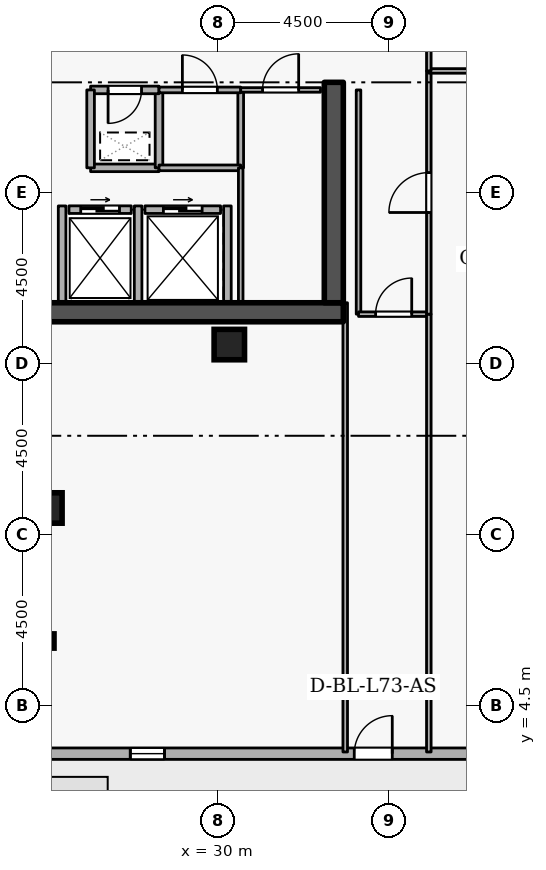
"""IFC4 building model, lengths in metres.
Left out: names, types, materials, properties, quantities, classifications, styles, units other than length and angle.
Written with IfcOpenShell. Run it as: python <this file> out.ifc"""

import sys

from ifc_helpers import new_model, si_unit, direction, frame, frame_2d, origin, origin_2d, place, context, subcontext, project, spatial, rectangle, i_section, extrude, element, fill, save


model = new_model("IFC4")
c1 = context("Model", 3, precision=1e-05, world=origin(), true_north=direction((0.0, 1.0)))
c2 = subcontext(c1, "Body", "Model", "MODEL_VIEW")
j1 = project(units=[si_unit("LENGTHUNIT", "METRE"), si_unit("PLANEANGLEUNIT", "RADIAN")], contexts=[c1])
p1 = place(None, origin())
s1 = spatial("IfcSite", under=j1, at=p1, CompositionType="ELEMENT")
p2 = place(p1, origin())
s2 = spatial("IfcBuilding", under=s1, at=p2, CompositionType="ELEMENT")
p3 = place(p2, frame((0.0, 0.0, 272.7)))
s3 = spatial("IfcBuildingStorey", under=s2, at=p3, CompositionType="ELEMENT", Elevation=272.7)
p4 = place(p3, frame((17.7, 14.85, 0.0), z_axis=(0.0, 0.0, 1.0), x_axis=(1.0, 0.0, 0.0)))
e1 = element("IfcWall", 1, at=p4, inside=s3, PredefinedType="SHEAR", context=c2, shape_type="SweptSolid", body=[
    extrude(rectangle(XDim=15.6, YDim=0.5, at=frame_2d((7.8, 0.0))), origin(), (0.0, 0.0, 1.0), 3.6),
])
p5 = place(p3, frame((33.05, 15.1, 0.0), z_axis=(0.0, 0.0, 1.0), x_axis=(0.0, 1.0, 0.0)))
e2 = element("IfcWall", 2, at=p5, inside=s3, PredefinedType="SHEAR", context=c2, shape_type="SweptSolid", body=[
    extrude(rectangle(XDim=5.8, YDim=0.5, at=frame_2d((2.9, 0.0))), origin(), (0.0, 0.0, 1.0), 3.6),
])
for number, where, z_axis, x_axis in (
    (3, (25.5, 9.7, 0.0), (0.0, 0.0, 1.0), (1.0, 0.0, 0.0)),
    (4, (30.3, 14.0, 0.0), (0.0, 0.0, 1.0), (1.0, 0.0, 0.0)),
):
    element("IfcColumn", number, at=place(p3, frame(where, z_axis=z_axis, x_axis=x_axis)), inside=s3, PredefinedType="COLUMN", context=c2, shape_type="SweptSolid", body=[
        extrude(rectangle(XDim=0.8, YDim=0.8, at=origin_2d()), origin(), (0.0, 0.0, 1.0), 3.6),
    ])
p6 = place(p3, frame((25.5, 6.2, 0.0), z_axis=(0.0, 0.0, 1.0), x_axis=(1.0, 0.0, 0.0)))
e5 = element("IfcColumn", 5, at=p6, inside=s3, PredefinedType="COLUMN", context=c2, shape_type="SweptSolid", body=[
    extrude(i_section(OverallWidth=0.375, OverallDepth=0.375, WebThickness=0.017, FlangeThickness=0.027, FilletRadius=0.015, at=origin_2d()), origin(), (0.0, 0.0, 1.0), 3.6),
])
p7 = place(p3, frame((10.594, 3.236, 0.0), z_axis=(0.0, 0.0, 1.0), x_axis=(0.999999999634, -2.7061402e-05, 0.0)))
e6 = element("IfcWall", 6, at=p7, inside=s3, PredefinedType="STANDARD", context=c2, shape_type="SweptSolid", body=[
    extrude(rectangle(XDim=36.087, YDim=0.3, at=frame_2d((18.043, 0.0))), origin(), (0.0, 0.0, 1.0), 2.7),
])
p8 = place(p7, frame((22.993, 0.0, 0.0)))
e7 = element("IfcOpeningElement", 7, at=p8, cuts=e6, PredefinedType="OPENING", context=c2, shape_type="SweptSolid", body=[
    extrude(rectangle(XDim=1.0, YDim=2.08, at=frame_2d((0.5, 1.04))), frame((0.0, 0.16, 0.0), z_axis=(0.0, -1.0, 0.0), x_axis=(1.0, 0.0, 0.0)), (0.0, 0.0, 1.0), 0.32),
])
p9 = place(p7, frame((2.7, 0.0, 0.72)))
e8 = element("IfcOpeningElement", 8, at=p9, cuts=e6, PredefinedType="OPENING", context=c2, shape_type="SweptSolid", body=[
    extrude(rectangle(XDim=0.9, YDim=1.75, at=frame_2d((0.45, 0.875))), frame((0.0, 0.16, 0.0), z_axis=(0.0, -1.0, 0.0), x_axis=(1.0, 0.0, 0.0)), (0.0, 0.0, 1.0), 0.32),
])
p10 = place(p7, frame((7.5, 0.0, 0.72)))
e9 = element("IfcOpeningElement", 9, at=p10, cuts=e6, PredefinedType="OPENING", context=c2, shape_type="SweptSolid", body=[
    extrude(rectangle(XDim=0.9, YDim=1.75, at=frame_2d((0.45, 0.875))), frame((0.0, 0.16, 0.0), z_axis=(0.0, -1.0, 0.0), x_axis=(1.0, 0.0, 0.0)), (0.0, 0.0, 1.0), 0.32),
])
p11 = place(p7, frame((12.3, 0.0, 0.72)))
e10 = element("IfcOpeningElement", 10, at=p11, cuts=e6, PredefinedType="OPENING", context=c2, shape_type="SweptSolid", body=[
    extrude(rectangle(XDim=0.9, YDim=1.75, at=frame_2d((0.45, 0.875))), frame((0.0, 0.16, 0.0), z_axis=(0.0, -1.0, 0.0), x_axis=(1.0, 0.0, 0.0)), (0.0, 0.0, 1.0), 0.32),
])
p12 = place(p7, frame((17.1, 0.0, 0.72)))
e11 = element("IfcOpeningElement", 11, at=p12, cuts=e6, PredefinedType="OPENING", context=c2, shape_type="SweptSolid", body=[
    extrude(rectangle(XDim=0.9, YDim=1.75, at=frame_2d((0.45, 0.875))), frame((0.0, 0.16, 0.0), z_axis=(0.0, -1.0, 0.0), x_axis=(1.0, 0.0, 0.0)), (0.0, 0.0, 1.0), 0.32),
])
p13 = place(p7, frame((26.7, 0.0, 0.72)))
e12 = element("IfcOpeningElement", 12, at=p13, cuts=e6, PredefinedType="OPENING", context=c2, shape_type="SweptSolid", body=[
    extrude(rectangle(XDim=0.9, YDim=1.75, at=frame_2d((0.45, 0.875))), frame((0.0, 0.16, 0.0), z_axis=(0.0, -1.0, 0.0), x_axis=(1.0, 0.0, 0.0)), (0.0, 0.0, 1.0), 0.32),
])
p14 = place(p7, frame((31.5, 0.0, 0.72)))
e13 = element("IfcOpeningElement", 13, at=p14, cuts=e6, PredefinedType="OPENING", context=c2, shape_type="SweptSolid", body=[
    extrude(rectangle(XDim=0.9, YDim=1.75, at=frame_2d((0.45, 0.875))), frame((0.0, 0.16, 0.0), z_axis=(0.0, -1.0, 0.0), x_axis=(1.0, 0.0, 0.0)), (0.0, 0.0, 1.0), 0.32),
])
p15 = place(p3, frame((26.08, 17.55, 0.0), z_axis=(0.0, 0.0, 1.0), x_axis=(1.0, 0.0, 0.0)))
e14 = element("IfcWall", 14, at=p15, inside=s3, PredefinedType="STANDARD", context=c2, shape_type="SweptSolid", body=[
    extrude(rectangle(XDim=1.64, YDim=0.2, at=frame_2d((0.82, 0.0))), origin(), (0.0, 0.0, 1.0), 3.34),
])
p16 = place(p15, frame((0.31, 0.0, 0.0)))
e15 = element("IfcOpeningElement", 15, at=p16, cuts=e14, PredefinedType="OPENING", context=c2, shape_type="SweptSolid", body=[
    extrude(rectangle(XDim=1.02, YDim=2.06, at=frame_2d((0.51, 1.03))), frame((0.0, 0.11, 0.0), z_axis=(0.0, -1.0, 0.0), x_axis=(1.0, 0.0, 0.0)), (0.0, 0.0, 1.0), 0.22),
])
p17 = place(p3, frame((28.08, 17.55, 0.0), z_axis=(0.0, 0.0, 1.0), x_axis=(1.0, 0.0, 0.0)))
e16 = element("IfcWall", 16, at=p17, inside=s3, PredefinedType="STANDARD", context=c2, shape_type="SweptSolid", body=[
    extrude(rectangle(XDim=1.99, YDim=0.2, at=frame_2d((0.995, 0.0))), origin(), (0.0, 0.0, 1.0), 3.34),
])
p18 = place(p17, frame((0.485, 0.0, 0.0)))
e17 = element("IfcOpeningElement", 17, at=p18, cuts=e16, PredefinedType="OPENING", context=c2, shape_type="SweptSolid", body=[
    extrude(rectangle(XDim=1.02, YDim=2.06, at=frame_2d((0.51, 1.03))), frame((0.0, 0.11, 0.0), z_axis=(0.0, -1.0, 0.0), x_axis=(1.0, 0.0, 0.0)), (0.0, 0.0, 1.0), 0.22),
])
for number, where, z_axis, x_axis in (
    (18, (27.9, 15.112, 0.0), (0.0, 0.0, 1.0), (0.0, 1.0, 0.0)),
    (19, (25.9, 15.112, 0.0), (0.0, 0.0, 1.0), (0.0, 1.0, 0.0)),
    (20, (30.25, 15.112, 0.0), (0.0, 0.0, 1.0), (0.0, 1.0, 0.0)),
):
    element("IfcWall", number, at=place(p3, frame(where, z_axis=z_axis, x_axis=x_axis)), inside=s3, PredefinedType="STANDARD", context=c2, shape_type="SweptSolid", body=[
        extrude(rectangle(XDim=2.536, YDim=0.2, at=frame_2d((1.268, 0.0))), origin(), (0.0, 0.0, 1.0), 3.34),
    ])
p19 = place(p3, frame((26.65, 18.65, 0.0), z_axis=(0.0, 0.0, 1.0), x_axis=(1.0, 0.0, 0.0)))
e21 = element("IfcWall", 21, at=p19, inside=s3, PredefinedType="STANDARD", context=c2, shape_type="SweptSolid", body=[
    extrude(rectangle(XDim=1.8, YDim=0.2, at=frame_2d((0.9, 0.0))), origin(), (0.0, 0.0, 1.0), 3.34),
])
p20 = place(p3, frame((28.45, 18.65, 0.0), z_axis=(0.0, 0.0, 1.0), x_axis=(0.0, 1.0, 0.0)))
e22 = element("IfcWall", 22, at=p20, inside=s3, PredefinedType="STANDARD", context=c2, shape_type="SweptSolid", body=[
    extrude(rectangle(XDim=2.05, YDim=0.2, at=frame_2d((1.025, 0.0))), origin(), (0.0, 0.0, 1.0), 3.34),
])
p21 = place(p3, frame((28.45, 20.7, 0.0), z_axis=(0.0, 0.0, 1.0), x_axis=(-1.0, 0.0, 0.0)))
e23 = element("IfcWall", 23, at=p21, inside=s3, PredefinedType="STANDARD", context=c2, shape_type="SweptSolid", body=[
    extrude(rectangle(XDim=1.8, YDim=0.2, at=frame_2d((0.9, 0.0))), origin(), (0.0, 0.0, 1.0), 3.34),
])
p22 = place(p21, frame((0.46, 0.0, 0.0)))
e24 = element("IfcOpeningElement", 24, at=p22, cuts=e23, PredefinedType="OPENING", context=c2, shape_type="SweptSolid", body=[
    extrude(rectangle(XDim=0.88, YDim=2.04, at=frame_2d((0.44, 1.02))), frame((0.0, 0.11, 0.0), z_axis=(0.0, -1.0, 0.0), x_axis=(1.0, 0.0, 0.0)), (0.0, 0.0, 1.0), 0.22),
])
p23 = place(p3, frame((26.65, 20.7, 0.0), z_axis=(0.0, 0.0, 1.0), x_axis=(0.0, -1.0, 0.0)))
e25 = element("IfcWall", 25, at=p23, inside=s3, PredefinedType="STANDARD", context=c2, shape_type="SweptSolid", body=[
    extrude(rectangle(XDim=2.05, YDim=0.2, at=frame_2d((1.025, 0.0))), origin(), (0.0, 0.0, 1.0), 3.34),
])
p24 = place(p3, frame((30.6, 20.7, 0.0), z_axis=(0.0, 0.0, 1.0), x_axis=(0.0, -1.0, 0.0)))
e26 = element("IfcWall", 26, at=p24, inside=s3, PredefinedType="PARTITIONING", context=c2, shape_type="SweptSolid", body=[
    extrude(rectangle(XDim=2.05, YDim=0.15, at=frame_2d((1.025, 0.0))), origin(), (0.0, 0.0, 1.0), 3.34),
])
p25 = place(p3, frame((30.6, 18.65, 0.0), z_axis=(0.0, 0.0, 1.0), x_axis=(-1.0, 0.0, 0.0)))
e27 = element("IfcWall", 27, at=p25, inside=s3, PredefinedType="PARTITIONING", context=c2, shape_type="SweptSolid", body=[
    extrude(rectangle(XDim=2.15, YDim=0.15, at=frame_2d((1.075, 0.0))), origin(), (0.0, 0.0, 1.0), 3.34),
])
p26 = place(p3, frame((28.45, 20.7, 0.0), z_axis=(0.0, 0.0, 1.0), x_axis=(1.0, 0.0, 0.0)))
e28 = element("IfcWall", 28, at=p26, inside=s3, PredefinedType="PARTITIONING", context=c2, shape_type="SweptSolid", body=[
    extrude(rectangle(XDim=2.15, YDim=0.15, at=frame_2d((1.075, 0.0))), origin(), (0.0, 0.0, 1.0), 3.34),
])
p27 = place(p26, frame((0.615, 0.0, 0.0)))
e29 = element("IfcOpeningElement", 29, at=p27, cuts=e28, PredefinedType="OPENING", context=c2, shape_type="SweptSolid", body=[
    extrude(rectangle(XDim=0.92, YDim=2.08, at=frame_2d((0.46, 1.04))), frame((0.0, 0.085, 0.0), z_axis=(0.0, -1.0, 0.0), x_axis=(1.0, 0.0, 0.0)), (0.0, 0.0, 1.0), 0.17),
])
p28 = place(p3, frame((30.6, 15.1, 0.0), z_axis=(0.0, 0.0, 1.0), x_axis=(0.0, 1.0, 0.0)))
e30 = element("IfcWall", 30, at=p28, inside=s3, PredefinedType="PARTITIONING", context=c2, shape_type="SweptSolid", body=[
    extrude(rectangle(XDim=3.55, YDim=0.12, at=frame_2d((1.775, 0.0))), origin(), (0.0, 0.0, 1.0), 3.34),
])
p29 = place(p3, frame((30.6, 20.7, 0.0), z_axis=(0.0, 0.0, 1.0), x_axis=(1.0, 0.0, 0.0)))
e31 = element("IfcWall", 31, at=p29, inside=s3, PredefinedType="PARTITIONING", context=c2, shape_type="SweptSolid", body=[
    extrude(rectangle(XDim=2.1, YDim=0.12, at=frame_2d((1.05, 0.0))), origin(), (0.0, 0.0, 1.0), 3.34),
])
p30 = place(p29, frame((0.575, 0.0, 0.0)))
e32 = element("IfcOpeningElement", 32, at=p30, cuts=e31, PredefinedType="OPENING", context=c2, shape_type="SweptSolid", body=[
    extrude(rectangle(XDim=0.95, YDim=2.1, at=frame_2d((0.475, 1.05))), frame((0.0, 0.07, 0.0), z_axis=(0.0, -1.0, 0.0), x_axis=(1.0, 0.0, 0.0)), (0.0, 0.0, 1.0), 0.14),
])
p31 = place(p3, frame((33.7, 20.7, 0.0), z_axis=(0.0, 0.0, 1.0), x_axis=(0.0, -1.0, 0.0)))
e33 = element("IfcWall", 33, at=p31, inside=s3, PredefinedType="PARTITIONING", context=c2, shape_type="SweptSolid", body=[
    extrude(rectangle(XDim=5.9, YDim=0.12, at=frame_2d((2.95, 0.0))), origin(), (0.0, 0.0, 1.0), 3.34),
])
p32 = place(p3, frame((33.7, 14.8, 0.0), z_axis=(0.0, 0.0, 1.0), x_axis=(1.0, 0.0, 0.0)))
e34 = element("IfcWall", 34, at=p32, inside=s3, PredefinedType="PARTITIONING", context=c2, shape_type="SweptSolid", body=[
    extrude(rectangle(XDim=1.85, YDim=0.12, at=frame_2d((0.925, 0.0))), origin(), (0.0, 0.0, 1.0), 3.34),
])
p33 = place(p32, frame((0.45, 0.0, 0.0)))
e35 = element("IfcOpeningElement", 35, at=p33, cuts=e34, PredefinedType="OPENING", context=c2, shape_type="SweptSolid", body=[
    extrude(rectangle(XDim=0.95, YDim=2.1, at=frame_2d((0.475, 1.05))), frame((0.0, 0.07, 0.0), z_axis=(0.0, -1.0, 0.0), x_axis=(1.0, 0.0, 0.0)), (0.0, 0.0, 1.0), 0.14),
])
p34 = place(p3, frame((35.55, 14.8, 0.0), z_axis=(0.0, 0.0, 1.0), x_axis=(0.0, -1.0, 0.0)))
e36 = element("IfcWall", 36, at=p34, inside=s3, PredefinedType="PARTITIONING", context=c2, shape_type="SweptSolid", body=[
    extrude(rectangle(XDim=11.52, YDim=0.12, at=frame_2d((5.76, 0.0))), origin(), (0.0, 0.0, 1.0), 3.34),
])
p35 = place(p3, frame((33.35, 3.28, 0.0), z_axis=(0.0, 0.0, 1.0), x_axis=(0.0, 1.0, 0.0)))
e37 = element("IfcWall", 37, at=p35, inside=s3, PredefinedType="PARTITIONING", context=c2, shape_type="SweptSolid", body=[
    extrude(rectangle(XDim=11.82, YDim=0.12, at=frame_2d((5.91, 0.0))), origin(), (0.0, 0.0, 1.0), 2.545),
])
p36 = place(p3, frame((35.55, 14.8, 0.0), z_axis=(0.0, 0.0, 1.0), x_axis=(0.0, 1.0, 0.0)))
e38 = element("IfcWall", 38, at=p36, inside=s3, PredefinedType="PARTITIONING", context=c2, shape_type="SweptSolid", body=[
    extrude(rectangle(XDim=6.4, YDim=0.12, at=frame_2d((3.2, 0.0))), origin(), (0.0, 0.0, 1.0), 3.34),
])
p37 = place(p36, frame((2.675, 0.0, 0.0)))
e39 = element("IfcOpeningElement", 39, at=p37, cuts=e38, PredefinedType="OPENING", context=c2, shape_type="SweptSolid", body=[
    extrude(rectangle(XDim=1.05, YDim=2.1, at=frame_2d((0.525, 1.05))), frame((0.0, 0.07, 0.0), z_axis=(0.0, -1.0, 0.0), x_axis=(1.0, 0.0, 0.0)), (0.0, 0.0, 1.0), 0.14),
])
p38 = place(p3, frame((35.55, 21.2, 0.0), z_axis=(0.0, 0.0, 1.0), x_axis=(1.0, 0.0, 0.0)))
e40 = element("IfcWall", 40, at=p38, inside=s3, PredefinedType="PARTITIONING", context=c2, shape_type="SweptSolid", body=[
    extrude(rectangle(XDim=13.67, YDim=0.12, at=frame_2d((6.835, 0.0))), origin(), (0.0, 0.0, 1.0), 3.34),
])
p39 = place(p3, frame((35.55, 21.2, 0.0), z_axis=(0.0, 0.0, 1.0), x_axis=(0.0, 1.0, 0.0)))
e41 = element("IfcWall", 41, at=p39, inside=s3, PredefinedType="PARTITIONING", context=c2, shape_type="SweptSolid", body=[
    extrude(rectangle(XDim=5.4, YDim=0.12, at=frame_2d((2.7, 0.0))), origin(), (0.0, 0.0, 1.0), 3.34),
])
p40 = place(p39, frame((2.225, 0.0, 0.0)))
e42 = element("IfcOpeningElement", 42, at=p40, cuts=e41, PredefinedType="OPENING", context=c2, shape_type="SweptSolid", body=[
    extrude(rectangle(XDim=0.95, YDim=2.1, at=frame_2d((0.475, 1.05))), frame((0.0, 0.07, 0.0), z_axis=(0.0, -1.0, 0.0), x_axis=(1.0, 0.0, 0.0)), (0.0, 0.0, 1.0), 0.14),
])
p41 = place(p8, origin())
e43 = element("IfcDoor", 43, at=p41, inside=s3, OperationType="SINGLE_SWING_RIGHT", PredefinedType="DOOR", context=c2, shape_type="SweptSolid", body=[
    extrude(rectangle(XDim=1.0, YDim=2.08, at=frame_2d((0.5, 1.04))), frame((0.0, 0.025, 0.0), z_axis=(0.0, -1.0, 0.0), x_axis=(1.0, 0.0, 0.0)), (0.0, 0.0, 1.0), 0.05),
])
fill(e7, e43)
p42 = place(p12, origin())
e44 = element("IfcWindow", 44, at=p42, inside=s3, PartitioningType="SINGLE_PANEL", PredefinedType="WINDOW", context=c2, shape_type="SweptSolid", body=[
    extrude(rectangle(XDim=0.9, YDim=1.75, at=frame_2d((0.45, 0.875))), frame((0.0, 0.03, 0.0), z_axis=(0.0, -1.0, 0.0), x_axis=(1.0, 0.0, 0.0)), (0.0, 0.0, 1.0), 0.06),
])
fill(e11, e44)
p43 = place(p16, origin())
e45 = element("IfcDoor", 45, at=p43, inside=s3, OperationType="SLIDING_TO_LEFT", PredefinedType="DOOR", context=c2, shape_type="SweptSolid", body=[
    extrude(rectangle(XDim=1.02, YDim=2.06, at=frame_2d((0.51, 1.03))), frame((0.0, 0.025, 0.0), z_axis=(0.0, -1.0, 0.0), x_axis=(1.0, 0.0, 0.0)), (0.0, 0.0, 1.0), 0.05),
])
fill(e15, e45)
p44 = place(p18, origin())
e46 = element("IfcDoor", 46, at=p44, inside=s3, OperationType="SLIDING_TO_LEFT", PredefinedType="DOOR", context=c2, shape_type="SweptSolid", body=[
    extrude(rectangle(XDim=1.02, YDim=2.06, at=frame_2d((0.51, 1.03))), frame((0.0, 0.025, 0.0), z_axis=(0.0, -1.0, 0.0), x_axis=(1.0, 0.0, 0.0)), (0.0, 0.0, 1.0), 0.05),
])
fill(e17, e46)
p45 = place(p22, origin())
e47 = element("IfcDoor", 47, at=p45, inside=s3, OperationType="SINGLE_SWING_RIGHT", PredefinedType="DOOR", context=c2, shape_type="SweptSolid", body=[
    extrude(rectangle(XDim=0.88, YDim=2.04, at=frame_2d((0.44, 1.02))), frame((0.0, 0.025, 0.0), z_axis=(0.0, -1.0, 0.0), x_axis=(1.0, 0.0, 0.0)), (0.0, 0.0, 1.0), 0.05),
])
fill(e24, e47)
p46 = place(p27, origin())
e48 = element("IfcDoor", 48, at=p46, inside=s3, OperationType="SINGLE_SWING_LEFT", PredefinedType="DOOR", context=c2, shape_type="SweptSolid", body=[
    extrude(rectangle(XDim=0.92, YDim=2.08, at=frame_2d((0.46, 1.04))), frame((0.0, 0.025, 0.0), z_axis=(0.0, -1.0, 0.0), x_axis=(1.0, 0.0, 0.0)), (0.0, 0.0, 1.0), 0.05),
])
fill(e29, e48)
p47 = place(p30, origin())
e49 = element("IfcDoor", 49, at=p47, inside=s3, OperationType="SINGLE_SWING_RIGHT", PredefinedType="DOOR", context=c2, shape_type="SweptSolid", body=[
    extrude(rectangle(XDim=0.95, YDim=2.1, at=frame_2d((0.475, 1.05))), frame((0.0, 0.025, 0.0), z_axis=(0.0, -1.0, 0.0), x_axis=(1.0, 0.0, 0.0)), (0.0, 0.0, 1.0), 0.05),
])
fill(e32, e49)
p48 = place(p33, origin())
e50 = element("IfcDoor", 50, at=p48, inside=s3, OperationType="SINGLE_SWING_RIGHT", PredefinedType="DOOR", context=c2, shape_type="SweptSolid", body=[
    extrude(rectangle(XDim=0.95, YDim=2.1, at=frame_2d((0.475, 1.05))), frame((0.0, 0.025, 0.0), z_axis=(0.0, -1.0, 0.0), x_axis=(1.0, 0.0, 0.0)), (0.0, 0.0, 1.0), 0.05),
])
fill(e35, e50)
p49 = place(p37, origin())
e51 = element("IfcDoor", 51, at=p49, inside=s3, OperationType="SINGLE_SWING_LEFT", PredefinedType="DOOR", context=c2, shape_type="SweptSolid", body=[
    extrude(rectangle(XDim=1.05, YDim=2.1, at=frame_2d((0.525, 1.05))), frame((0.0, 0.025, 0.0), z_axis=(0.0, -1.0, 0.0), x_axis=(1.0, 0.0, 0.0)), (0.0, 0.0, 1.0), 0.05),
])
fill(e39, e51)
save(model, sys.argv[1])
